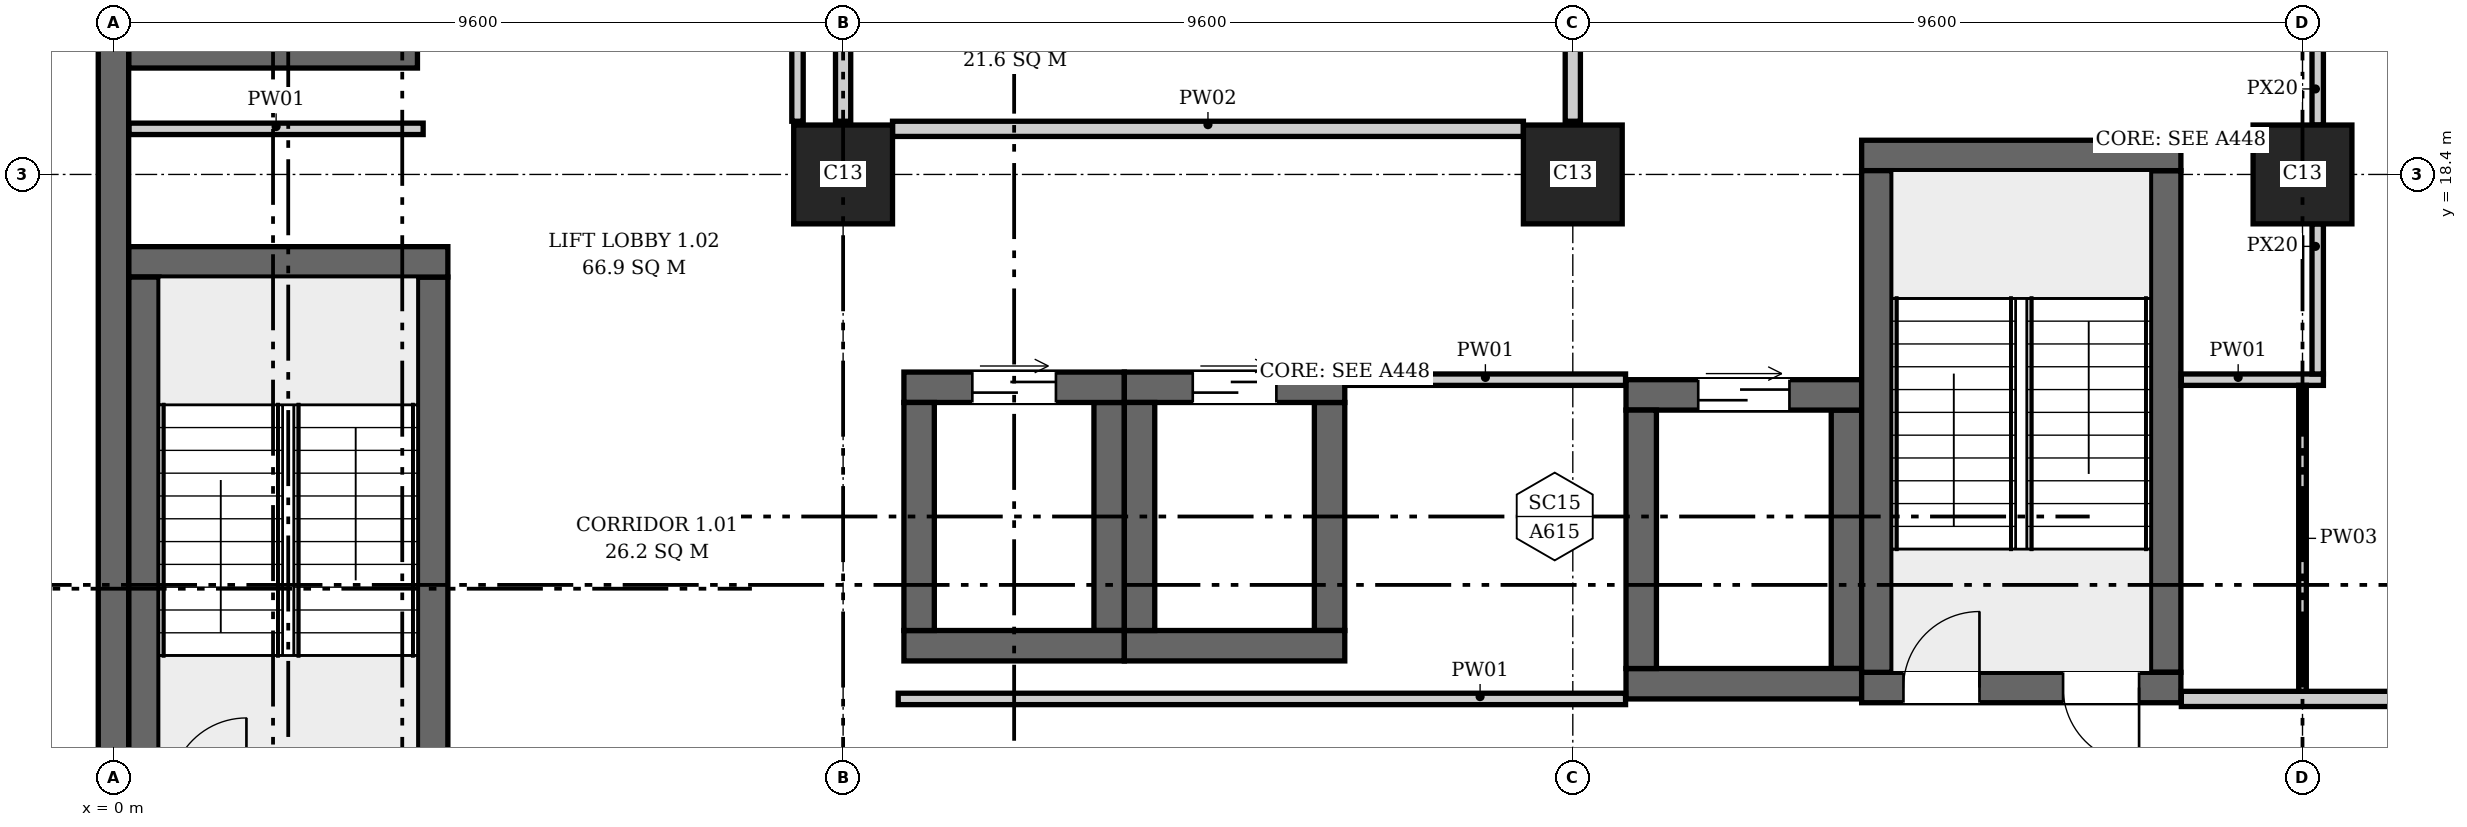
"""IFC4 building model, lengths in metres.
Left out: names, types, materials, properties, quantities, classifications, styles, units other than length and angle.
Written with IfcOpenShell. Run it as: python <this file> out.ifc"""

import sys

from ifc_helpers import new_model, si_unit, direction, frame, frame_2d, origin, origin_2d, place, context, subcontext, project, spatial, rectangle, extrude, element, fill, save


model = new_model("IFC4")
c1 = context("Model", 3, precision=1e-05, world=origin(), true_north=direction((0.0, 1.0)))
c2 = subcontext(c1, "Body", "Model", "MODEL_VIEW")
j1 = project(units=[si_unit("LENGTHUNIT", "METRE"), si_unit("PLANEANGLEUNIT", "RADIAN")], contexts=[c1])
p1 = place(None, origin())
s1 = spatial("IfcSite", under=j1, at=p1, CompositionType="ELEMENT")
p2 = place(p1, origin())
s2 = spatial("IfcBuilding", under=s1, at=p2, CompositionType="ELEMENT")
p3 = place(p2, frame((0.0, 0.0, 6.5)))
s3 = spatial("IfcBuildingStorey", under=s2, at=p3, CompositionType="ELEMENT", Elevation=6.5)
p4 = place(p3, frame((0.0, -0.2, 0.0), z_axis=(0.0, 0.0, 1.0), x_axis=(0.0, 1.0, 0.0)))
e1 = element("IfcWall", 1, at=p4, inside=s3, PredefinedType="SHEAR", context=c2, shape_type="SweptSolid", body=[
    extrude(rectangle(XDim=46.88, YDim=0.4, at=frame_2d((23.44, 0.0))), origin(), (0.0, 0.0, 1.0), 7.7),
])
p5 = place(p3, frame((0.2, 17.25, 0.0), z_axis=(0.0, 0.0, 1.0), x_axis=(1.0, 0.0, 0.0)))
e2 = element("IfcWall", 2, at=p5, inside=s3, PredefinedType="SHEAR", context=c2, shape_type="SweptSolid", body=[
    extrude(rectangle(XDim=4.2, YDim=0.4, at=frame_2d((2.1, 0.0))), origin(), (0.0, 0.0, 1.0), 7.7),
])
for number, where, z_axis, x_axis in (
    (3, (0.4, 10.45, 0.0), (0.0, 0.0, 1.0), (0.0, 1.0, 0.0)),
    (4, (4.2, 10.45, 0.0), (0.0, 0.0, 1.0), (0.0, 1.0, 0.0)),
):
    element("IfcWall", number, at=place(p3, frame(where, z_axis=z_axis, x_axis=x_axis)), inside=s3, PredefinedType="SHEAR", context=c2, shape_type="SweptSolid", body=[
        extrude(rectangle(XDim=6.6, YDim=0.4, at=frame_2d((3.3, 0.0))), origin(), (0.0, 0.0, 1.0), 7.7),
    ])
p6 = place(p3, frame((23.0, 11.65, 0.0), z_axis=(0.0, 0.0, 1.0), x_axis=(1.0, 0.0, 0.0)))
e5 = element("IfcWall", 5, at=p6, inside=s3, PredefinedType="SHEAR", context=c2, shape_type="SweptSolid", body=[
    extrude(rectangle(XDim=4.2, YDim=0.4, at=frame_2d((2.1, 0.0))), origin(), (0.0, 0.0, 1.0), 7.7),
])
p7 = place(p6, frame((0.55, 0.0, 0.0)))
e6 = element("IfcOpeningElement", 6, at=p7, cuts=e5, PredefinedType="OPENING", context=c2, shape_type="SweptSolid", body=[
    extrude(rectangle(XDim=1.0, YDim=2.1, at=frame_2d((0.5, 1.05))), frame((0.0, 0.21, 0.0), z_axis=(0.0, -1.0, 0.0), x_axis=(1.0, 0.0, 0.0)), (0.0, 0.0, 1.0), 0.42),
])
p8 = place(p6, frame((2.65, 0.0, 0.0)))
e7 = element("IfcOpeningElement", 7, at=p8, cuts=e5, PredefinedType="OPENING", context=c2, shape_type="SweptSolid", body=[
    extrude(rectangle(XDim=1.0, YDim=2.1, at=frame_2d((0.5, 1.05))), frame((0.0, 0.21, 0.0), z_axis=(0.0, -1.0, 0.0), x_axis=(1.0, 0.0, 0.0)), (0.0, 0.0, 1.0), 0.42),
])
p9 = place(p3, frame((23.0, 18.65, 0.0), z_axis=(0.0, 0.0, 1.0), x_axis=(1.0, 0.0, 0.0)))
e8 = element("IfcWall", 8, at=p9, inside=s3, PredefinedType="SHEAR", context=c2, shape_type="SweptSolid", body=[
    extrude(rectangle(XDim=4.2, YDim=0.4, at=frame_2d((2.1, 0.0))), origin(), (0.0, 0.0, 1.0), 7.7),
])
for number, where, z_axis, x_axis in (
    (9, (23.2, 11.85, 0.0), (0.0, 0.0, 1.0), (0.0, 1.0, 0.0)),
    (10, (27.0, 11.85, 0.0), (0.0, 0.0, 1.0), (0.0, 1.0, 0.0)),
):
    element("IfcWall", number, at=place(p3, frame(where, z_axis=z_axis, x_axis=x_axis)), inside=s3, PredefinedType="SHEAR", context=c2, shape_type="SweptSolid", body=[
        extrude(rectangle(XDim=6.6, YDim=0.4, at=frame_2d((3.3, 0.0))), origin(), (0.0, 0.0, 1.0), 7.7),
    ])
p10 = place(p3, frame((0.2, 19.975, 0.0), z_axis=(0.0, 0.0, 1.0), x_axis=(1.0, 0.0, 0.0)))
e11 = element("IfcWall", 11, at=p10, inside=s3, PredefinedType="SHEAR", context=c2, shape_type="SweptSolid", body=[
    extrude(rectangle(XDim=3.8, YDim=0.35, at=frame_2d((1.9, 0.0))), origin(), (0.0, 0.0, 1.0), 7.7),
])
p11 = place(p3, frame((10.4, 12.2, 0.0), z_axis=(0.0, 0.0, 1.0), x_axis=(1.0, 0.0, 0.0)))
e12 = element("IfcWall", 12, at=p11, inside=s3, PredefinedType="SHEAR", context=c2, shape_type="SweptSolid", body=[
    extrude(rectangle(XDim=2.9, YDim=0.4, at=frame_2d((1.45, 0.0))), origin(), (0.0, 0.0, 1.0), 7.7),
])
p12 = place(p3, frame((10.4, 15.6, 0.0), z_axis=(0.0, 0.0, 1.0), x_axis=(1.0, 0.0, 0.0)))
e13 = element("IfcWall", 13, at=p12, inside=s3, PredefinedType="SHEAR", context=c2, shape_type="SweptSolid", body=[
    extrude(rectangle(XDim=2.9, YDim=0.4, at=frame_2d((1.45, 0.0))), origin(), (0.0, 0.0, 1.0), 7.7),
])
p13 = place(p12, frame((0.9, 0.0, 0.0)))
e14 = element("IfcOpeningElement", 14, at=p13, cuts=e13, PredefinedType="OPENING", context=c2, shape_type="SweptSolid", body=[
    extrude(rectangle(XDim=1.1, YDim=2.1, at=frame_2d((0.55, 1.05))), frame((0.0, 0.21, 0.0), z_axis=(0.0, -1.0, 0.0), x_axis=(1.0, 0.0, 0.0)), (0.0, 0.0, 1.0), 0.42),
])
for number, where, z_axis, x_axis in (
    (15, (10.6, 12.4, 0.0), (0.0, 0.0, 1.0), (0.0, 1.0, 0.0)),
    (16, (13.1, 12.4, 0.0), (0.0, 0.0, 1.0), (0.0, 1.0, 0.0)),
):
    element("IfcWall", number, at=place(p3, frame(where, z_axis=z_axis, x_axis=x_axis)), inside=s3, PredefinedType="SHEAR", context=c2, shape_type="SweptSolid", body=[
        extrude(rectangle(XDim=3.0, YDim=0.4, at=frame_2d((1.5, 0.0))), origin(), (0.0, 0.0, 1.0), 7.7),
    ])
p14 = place(p3, frame((13.3, 12.2, 0.0), z_axis=(0.0, 0.0, 1.0), x_axis=(1.0, 0.0, 0.0)))
e17 = element("IfcWall", 17, at=p14, inside=s3, PredefinedType="SHEAR", context=c2, shape_type="SweptSolid", body=[
    extrude(rectangle(XDim=2.9, YDim=0.4, at=frame_2d((1.45, 0.0))), origin(), (0.0, 0.0, 1.0), 7.7),
])
p15 = place(p3, frame((13.3, 15.6, 0.0), z_axis=(0.0, 0.0, 1.0), x_axis=(1.0, 0.0, 0.0)))
e18 = element("IfcWall", 18, at=p15, inside=s3, PredefinedType="SHEAR", context=c2, shape_type="SweptSolid", body=[
    extrude(rectangle(XDim=2.9, YDim=0.4, at=frame_2d((1.45, 0.0))), origin(), (0.0, 0.0, 1.0), 7.7),
])
p16 = place(p15, frame((0.9, 0.0, 0.0)))
e19 = element("IfcOpeningElement", 19, at=p16, cuts=e18, PredefinedType="OPENING", context=c2, shape_type="SweptSolid", body=[
    extrude(rectangle(XDim=1.1, YDim=2.1, at=frame_2d((0.55, 1.05))), frame((0.0, 0.21, 0.0), z_axis=(0.0, -1.0, 0.0), x_axis=(1.0, 0.0, 0.0)), (0.0, 0.0, 1.0), 0.42),
])
for number, where, z_axis, x_axis in (
    (20, (13.5, 12.4, 0.0), (0.0, 0.0, 1.0), (0.0, 1.0, 0.0)),
    (21, (16.0, 12.4, 0.0), (0.0, 0.0, 1.0), (0.0, 1.0, 0.0)),
):
    element("IfcWall", number, at=place(p3, frame(where, z_axis=z_axis, x_axis=x_axis)), inside=s3, PredefinedType="SHEAR", context=c2, shape_type="SweptSolid", body=[
        extrude(rectangle(XDim=3.0, YDim=0.4, at=frame_2d((1.5, 0.0))), origin(), (0.0, 0.0, 1.0), 7.7),
    ])
p17 = place(p3, frame((19.9, 11.7, 0.0), z_axis=(0.0, 0.0, 1.0), x_axis=(1.0, 0.0, 0.0)))
e22 = element("IfcWall", 22, at=p17, inside=s3, PredefinedType="SHEAR", context=c2, shape_type="SweptSolid", body=[
    extrude(rectangle(XDim=3.1, YDim=0.4, at=frame_2d((1.55, 0.0))), origin(), (0.0, 0.0, 1.0), 7.7),
])
p18 = place(p3, frame((19.9, 15.5, 0.0), z_axis=(0.0, 0.0, 1.0), x_axis=(1.0, 0.0, 0.0)))
e23 = element("IfcWall", 23, at=p18, inside=s3, PredefinedType="SHEAR", context=c2, shape_type="SweptSolid", body=[
    extrude(rectangle(XDim=3.1, YDim=0.4, at=frame_2d((1.55, 0.0))), origin(), (0.0, 0.0, 1.0), 7.7),
])
p19 = place(p18, frame((0.95, 0.0, 0.0)))
e24 = element("IfcOpeningElement", 24, at=p19, cuts=e23, PredefinedType="OPENING", context=c2, shape_type="SweptSolid", body=[
    extrude(rectangle(XDim=1.2, YDim=2.1, at=frame_2d((0.6, 1.05))), frame((0.0, 0.21, 0.0), z_axis=(0.0, -1.0, 0.0), x_axis=(1.0, 0.0, 0.0)), (0.0, 0.0, 1.0), 0.42),
])
for number, where, z_axis, x_axis in (
    (25, (20.1, 11.9, 0.0), (0.0, 0.0, 1.0), (0.0, 1.0, 0.0)),
    (26, (22.8, 11.9, 0.0), (0.0, 0.0, 1.0), (0.0, 1.0, 0.0)),
):
    element("IfcWall", number, at=place(p3, frame(where, z_axis=z_axis, x_axis=x_axis)), inside=s3, PredefinedType="SHEAR", context=c2, shape_type="SweptSolid", body=[
        extrude(rectangle(XDim=3.4, YDim=0.4, at=frame_2d((1.7, 0.0))), origin(), (0.0, 0.0, 1.0), 7.7),
    ])
for number, where, z_axis, x_axis in (
    (27, (9.6, 18.4, 0.0), (0.0, 0.0, 1.0), (1.0, 0.0, 0.0)),
    (28, (19.2, 18.4, 0.0), (0.0, 0.0, 1.0), (1.0, 0.0, 0.0)),
    (29, (28.8, 18.4, 0.0), (0.0, 0.0, 1.0), (1.0, 0.0, 0.0)),
):
    element("IfcColumn", number, at=place(p3, frame(where, z_axis=z_axis, x_axis=x_axis)), inside=s3, PredefinedType="COLUMN", context=c2, shape_type="SweptSolid", body=[
        extrude(rectangle(XDim=1.3, YDim=1.3, at=origin_2d()), origin(), (0.0, 0.0, 1.0), 7.7),
    ])
p20 = place(p3, frame((0.206, 19.0, 0.0), z_axis=(0.0, 0.0, 1.0), x_axis=(1.0, 0.0, 0.0)))
e30 = element("IfcWall", 30, at=p20, inside=s3, PredefinedType="PARTITIONING", context=c2, shape_type="SweptSolid", body=[
    extrude(rectangle(XDim=3.869, YDim=0.15, at=frame_2d((1.935, 0.0))), origin(), (0.0, 0.0, 1.0), 7.35),
])
p21 = place(p3, frame((9.0, 19.1, 0.0), z_axis=(0.0, 0.0, 1.0), x_axis=(0.0, 1.0, 0.0)))
e31 = element("IfcWall", 31, at=p21, inside=s3, PredefinedType="PARTITIONING", context=c2, shape_type="SweptSolid", body=[
    extrude(rectangle(XDim=2.3, YDim=0.15, at=frame_2d((1.15, 0.0))), origin(), (0.0, 0.0, 1.0), 6.95),
])
p22 = place(p3, frame((9.6, 19.1, 0.0), z_axis=(0.0, 0.0, 1.0), x_axis=(0.0, 1.0, 0.0)))
e32 = element("IfcWall", 32, at=p22, inside=s3, PredefinedType="PARTITIONING", context=c2, shape_type="SweptSolid", body=[
    extrude(rectangle(XDim=2.3, YDim=0.2, at=frame_2d((1.15, 0.0))), origin(), (0.0, 0.0, 1.0), 6.95),
])
p23 = place(p3, frame((10.25, 19.0, 0.0), z_axis=(0.0, 0.0, 1.0), x_axis=(1.0, 0.0, 0.0)))
e33 = element("IfcWall", 33, at=p23, inside=s3, PredefinedType="PARTITIONING", context=c2, shape_type="SweptSolid", body=[
    extrude(rectangle(XDim=8.3, YDim=0.2, at=frame_2d((4.15, 0.0))), origin(), (0.0, 0.0, 1.0), 7.35),
])
p24 = place(p3, frame((10.325, 11.5, 0.0), z_axis=(0.0, 0.0, 1.0), x_axis=(1.0, 0.0, 0.0)))
e34 = element("IfcWall", 34, at=p24, inside=s3, PredefinedType="PARTITIONING", context=c2, shape_type="SweptSolid", body=[
    extrude(rectangle(XDim=9.569, YDim=0.15, at=frame_2d((4.785, 0.0))), origin(), (0.0, 0.0, 1.0), 7.35),
])
p25 = place(p3, frame((16.206, 15.7, 0.0), z_axis=(0.0, 0.0, 1.0), x_axis=(1.0, 0.0, 0.0)))
e35 = element("IfcWall", 35, at=p25, inside=s3, PredefinedType="PARTITIONING", context=c2, shape_type="SweptSolid", body=[
    extrude(rectangle(XDim=3.688, YDim=0.15, at=frame_2d((1.844, 0.0))), origin(), (0.0, 0.0, 1.0), 7.35),
])
p26 = place(p3, frame((19.2, 19.1, 0.0), z_axis=(0.0, 0.0, 1.0), x_axis=(0.0, 1.0, 0.0)))
e36 = element("IfcWall", 36, at=p26, inside=s3, PredefinedType="PARTITIONING", context=c2, shape_type="SweptSolid", body=[
    extrude(rectangle(XDim=2.3, YDim=0.2, at=frame_2d((1.15, 0.0))), origin(), (0.0, 0.0, 1.0), 6.95),
])
p27 = place(p3, frame((27.206, 11.5, 0.0), z_axis=(0.0, 0.0, 1.0), x_axis=(1.0, 0.0, 0.0)))
e37 = element("IfcWall", 37, at=p27, inside=s3, PredefinedType="PARTITIONING", context=c2, shape_type="SweptSolid", body=[
    extrude(rectangle(XDim=26.494, YDim=0.2, at=frame_2d((13.247, 0.0))), origin(), (0.0, 0.0, 1.0), 7.35),
])
p28 = place(p27, frame((15.494, 0.0, 0.0)))
e38 = element("IfcOpeningElement", 38, at=p28, cuts=e37, PredefinedType="OPENING", context=c2, shape_type="SweptSolid", body=[
    extrude(rectangle(XDim=1.0, YDim=2.1, at=frame_2d((0.5, 1.05))), frame((0.0, 0.11, 0.0), z_axis=(0.0, -1.0, 0.0), x_axis=(1.0, 0.0, 0.0)), (0.0, 0.0, 1.0), 0.22),
])
p29 = place(p27, frame((23.059, 0.0, 0.0)))
e39 = element("IfcOpeningElement", 39, at=p29, cuts=e37, PredefinedType="OPENING", context=c2, shape_type="SweptSolid", body=[
    extrude(rectangle(XDim=1.0, YDim=2.1, at=frame_2d((0.5, 1.05))), frame((0.0, 0.11, 0.0), z_axis=(0.0, -1.0, 0.0), x_axis=(1.0, 0.0, 0.0)), (0.0, 0.0, 1.0), 0.22),
])
p30 = place(p3, frame((27.206, 15.7, 0.0), z_axis=(0.0, 0.0, 1.0), x_axis=(1.0, 0.0, 0.0)))
e40 = element("IfcWall", 40, at=p30, inside=s3, PredefinedType="PARTITIONING", context=c2, shape_type="SweptSolid", body=[
    extrude(rectangle(XDim=1.869, YDim=0.15, at=frame_2d((0.935, 0.0))), origin(), (0.0, 0.0, 1.0), 7.35),
])
p31 = place(p3, frame((28.8, 11.6, 0.0), z_axis=(0.0, 0.0, 1.0), x_axis=(0.0, 1.0, 0.0)))
e41 = element("IfcWall", 41, at=p31, inside=s3, PredefinedType="PARTITIONING", context=c2, shape_type="SweptSolid", body=[
    extrude(rectangle(XDim=4.025, YDim=0.1, at=frame_2d((2.012, 0.0))), origin(), (0.0, 0.0, 1.0), 6.95),
])
p32 = place(p3, frame((29.0, 15.775, 0.0), z_axis=(0.0, 0.0, 1.0), x_axis=(0.0, 1.0, 0.0)))
e42 = element("IfcWall", 42, at=p32, inside=s3, PredefinedType="PARTITIONING", context=c2, shape_type="SweptSolid", body=[
    extrude(rectangle(XDim=1.975, YDim=0.15, at=frame_2d((0.988, 0.0))), origin(), (0.0, 0.0, 1.0), 6.95),
])
p33 = place(p3, frame((29.0, 19.05, 0.0), z_axis=(0.0, 0.0, 1.0), x_axis=(0.0, 1.0, 0.0)))
e43 = element("IfcWall", 43, at=p33, inside=s3, PredefinedType="PARTITIONING", context=c2, shape_type="SweptSolid", body=[
    extrude(rectangle(XDim=2.375, YDim=0.15, at=frame_2d((1.188, 0.0))), origin(), (0.0, 0.0, 1.0), 6.95),
])
p34 = place(p7, origin())
e44 = element("IfcDoor", 44, at=p34, inside=s3, OperationType="SINGLE_SWING_RIGHT", PredefinedType="DOOR", context=c2, shape_type="SweptSolid", body=[
    extrude(rectangle(XDim=1.0, YDim=2.1, at=frame_2d((0.5, 1.05))), frame((0.0, 0.025, 0.0), z_axis=(0.0, -1.0, 0.0), x_axis=(1.0, 0.0, 0.0)), (0.0, 0.0, 1.0), 0.05),
])
fill(e6, e44)
p35 = place(p8, origin())
e45 = element("IfcDoor", 45, at=p35, inside=s3, OperationType="SINGLE_SWING_LEFT", PredefinedType="DOOR", context=c2, shape_type="SweptSolid", body=[
    extrude(rectangle(XDim=1.0, YDim=2.1, at=frame_2d((0.5, 1.05))), frame((0.0, 0.025, 0.0), z_axis=(0.0, -1.0, 0.0), x_axis=(1.0, 0.0, 0.0)), (0.0, 0.0, 1.0), 0.05),
])
fill(e7, e45)
p36 = place(p13, origin())
e46 = element("IfcDoor", 46, at=p36, inside=s3, OperationType="DOUBLE_DOOR_SLIDING", PredefinedType="DOOR", context=c2, shape_type="SweptSolid", body=[
    extrude(rectangle(XDim=1.1, YDim=2.1, at=frame_2d((0.55, 1.05))), frame((0.0, 0.025, 0.0), z_axis=(0.0, -1.0, 0.0), x_axis=(1.0, 0.0, 0.0)), (0.0, 0.0, 1.0), 0.05),
])
fill(e14, e46)
p37 = place(p16, origin())
e47 = element("IfcDoor", 47, at=p37, inside=s3, OperationType="DOUBLE_DOOR_SLIDING", PredefinedType="DOOR", context=c2, shape_type="SweptSolid", body=[
    extrude(rectangle(XDim=1.1, YDim=2.1, at=frame_2d((0.55, 1.05))), frame((0.0, 0.025, 0.0), z_axis=(0.0, -1.0, 0.0), x_axis=(1.0, 0.0, 0.0)), (0.0, 0.0, 1.0), 0.05),
])
fill(e19, e47)
p38 = place(p19, origin())
e48 = element("IfcDoor", 48, at=p38, inside=s3, OperationType="DOUBLE_DOOR_SLIDING", PredefinedType="DOOR", context=c2, shape_type="SweptSolid", body=[
    extrude(rectangle(XDim=1.2, YDim=2.1, at=frame_2d((0.6, 1.05))), frame((0.0, 0.025, 0.0), z_axis=(0.0, -1.0, 0.0), x_axis=(1.0, 0.0, 0.0)), (0.0, 0.0, 1.0), 0.05),
])
fill(e24, e48)
save(model, sys.argv[1])
